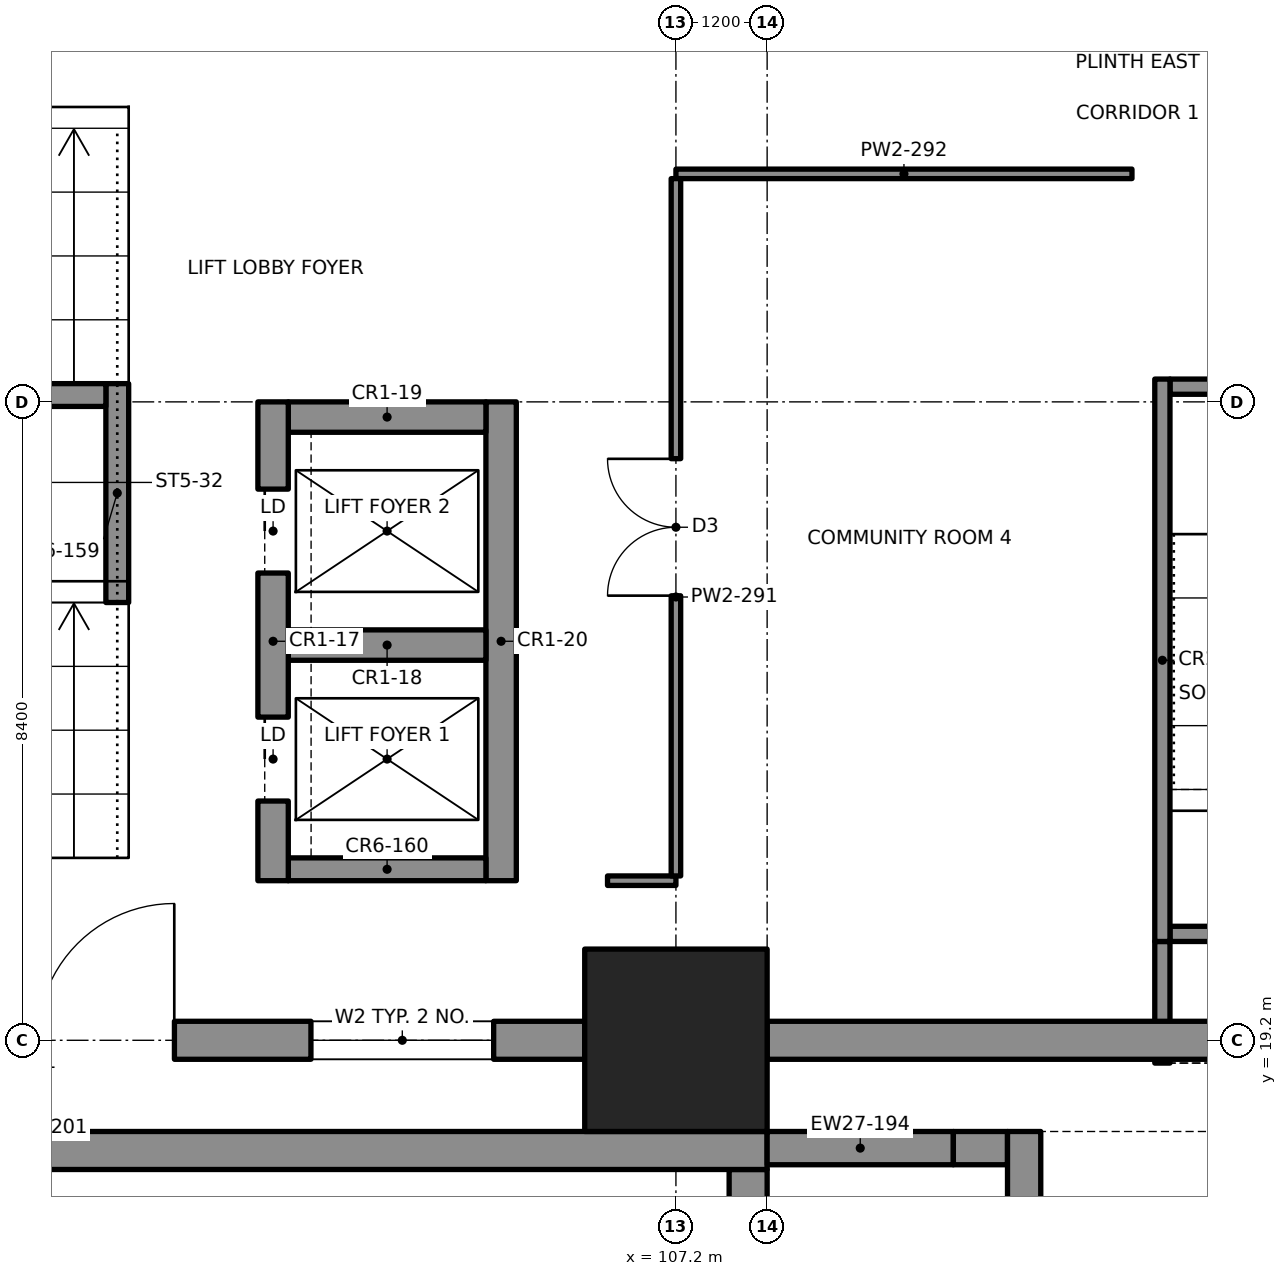
"""IFC4 building model, lengths in metres.
Left out: names, types, materials, properties, quantities, classifications, styles, units other than length and angle.
Written with IfcOpenShell. Run it as: python <this file> out.ifc"""

import sys

from ifc_helpers import new_model, si_unit, direction, frame, frame_2d, origin, origin_2d, place, context, subcontext, project, spatial, rectangle, extrude, element, fill, save


model = new_model("IFC4")
c1 = context("Model", 3, precision=1e-05, world=origin(), true_north=direction((0.0, 1.0)))
c2 = subcontext(c1, "Body", "Model", "MODEL_VIEW")
j1 = project(units=[si_unit("LENGTHUNIT", "METRE"), si_unit("PLANEANGLEUNIT", "RADIAN")], contexts=[c1])
p1 = place(None, origin())
s1 = spatial("IfcSite", under=j1, at=p1, CompositionType="ELEMENT")
p2 = place(p1, origin())
s2 = spatial("IfcBuilding", under=s1, at=p2, CompositionType="ELEMENT")
p3 = place(p2, origin())
s3 = spatial("IfcBuildingStorey", under=s2, at=p3, CompositionType="ELEMENT", Elevation=0.0)
p4 = place(p3, frame((107.2, 19.2, -0.9), z_axis=(0.0, 0.0, 1.0), x_axis=(1.0, 0.0, 0.0)))
e1 = element("IfcColumn", 1, at=p4, inside=s3, PredefinedType="COLUMN", context=c2, shape_type="SweptSolid", body=[
    extrude(rectangle(XDim=2.4, YDim=2.4, at=origin_2d()), origin(), (0.0, 0.0, 1.0), 5.3),
])
p5 = place(p3, frame((91.6, 19.2, 0.0), z_axis=(0.0, 0.0, 1.0), x_axis=(1.0, 0.0, 0.0)))
e2 = element("IfcWall", 2, at=p5, inside=s3, PredefinedType="SOLIDWALL", context=c2, shape_type="SweptSolid", body=[
    extrude(rectangle(XDim=14.4, YDim=0.5, at=frame_2d((7.2, 0.0))), origin(), (0.0, 0.0, 1.0), 3.65),
])
p6 = place(p5, frame((1.2, 0.0, 0.45)))
e3 = element("IfcOpeningElement", 3, at=p6, cuts=e2, PredefinedType="OPENING", context=c2, shape_type="SweptSolid", body=[
    extrude(rectangle(XDim=2.4, YDim=2.7, at=frame_2d((1.2, 1.35))), frame((0.0, 0.26, 0.0), z_axis=(0.0, -1.0, 0.0), x_axis=(1.0, 0.0, 0.0)), (0.0, 0.0, 1.0), 0.52),
])
p7 = place(p5, frame((10.8, 0.0, 0.45)))
e4 = element("IfcOpeningElement", 4, at=p7, cuts=e2, PredefinedType="OPENING", context=c2, shape_type="SweptSolid", body=[
    extrude(rectangle(XDim=2.4, YDim=2.7, at=frame_2d((1.2, 1.35))), frame((0.0, 0.26, 0.0), z_axis=(0.0, -1.0, 0.0), x_axis=(1.0, 0.0, 0.0)), (0.0, 0.0, 1.0), 0.52),
])
p8 = place(p5, frame((5.4, 0.0, 0.0)))
e5 = element("IfcOpeningElement", 5, at=p8, cuts=e2, PredefinedType="OPENING", context=c2, shape_type="SweptSolid", body=[
    extrude(rectangle(XDim=3.6, YDim=2.7, at=frame_2d((1.8, 1.35))), frame((0.0, 0.26, 0.0), z_axis=(0.0, -1.0, 0.0), x_axis=(1.0, 0.0, 0.0)), (0.0, 0.0, 1.0), 0.52),
])
p9 = place(p3, frame((108.4, 19.2, 0.0), z_axis=(0.0, 0.0, 1.0), x_axis=(1.0, 0.0, 0.0)))
e6 = element("IfcWall", 6, at=p9, inside=s3, PredefinedType="SOLIDWALL", context=c2, shape_type="SweptSolid", body=[
    extrude(rectangle(XDim=14.4, YDim=0.5, at=frame_2d((7.2, 0.0))), origin(), (0.0, 0.0, 1.0), 3.65),
])
p10 = place(p9, frame((11.04, 0.0, 0.45)))
e7 = element("IfcOpeningElement", 7, at=p10, cuts=e6, PredefinedType="OPENING", context=c2, shape_type="SweptSolid", body=[
    extrude(rectangle(XDim=2.4, YDim=2.7, at=frame_2d((1.2, 1.35))), frame((0.0, 0.26, 0.0), z_axis=(0.0, -1.0, 0.0), x_axis=(1.0, 0.0, 0.0)), (0.0, 0.0, 1.0), 0.52),
])
p11 = place(p9, frame((6.3, 0.0, 0.0)))
e8 = element("IfcOpeningElement", 8, at=p11, cuts=e6, PredefinedType="OPENING", context=c2, shape_type="SweptSolid", body=[
    extrude(rectangle(XDim=1.8, YDim=2.4, at=frame_2d((0.9, 1.2))), frame((0.0, 0.26, 0.0), z_axis=(0.0, -1.0, 0.0), x_axis=(1.0, 0.0, 0.0)), (0.0, 0.0, 1.0), 0.52),
])
p12 = place(p3, frame((108.15, 6.5, 0.0), z_axis=(0.0, 0.0, 1.0), x_axis=(0.0, 1.0, 0.0)))
e9 = element("IfcWall", 9, at=p12, inside=s3, PredefinedType="SOLIDWALL", context=c2, shape_type="SweptSolid", body=[
    extrude(rectangle(XDim=11.0, YDim=0.5, at=frame_2d((5.5, 0.0))), origin(), (0.0, 0.0, 1.0), 4.4),
])
p13 = place(p3, frame((89.2, 17.75, 0.0), z_axis=(0.0, 0.0, 1.0), x_axis=(1.0, 0.0, 0.0)))
e10 = element("IfcWall", 10, at=p13, inside=s3, PredefinedType="SOLIDWALL", context=c2, shape_type="SweptSolid", body=[
    extrude(rectangle(XDim=19.2, YDim=0.5, at=frame_2d((9.6, 0.0))), origin(), (0.0, 0.0, 1.0), 4.4),
])
p14 = place(p3, frame((111.781, 6.0, 0.0), z_axis=(0.0, 0.0, 1.0), x_axis=(0.0, 1.0, 0.0)))
e11 = element("IfcWall", 11, at=p14, inside=s3, PredefinedType="SOLIDWALL", context=c2, shape_type="SweptSolid", body=[
    extrude(rectangle(XDim=12.0, YDim=0.438, at=frame_2d((6.0, 0.0))), origin(), (0.0, 0.0, 1.0), 4.4),
])
p15 = place(p14, frame((1.8, 0.0, 0.9)))
e12 = element("IfcOpeningElement", 12, at=p15, cuts=e11, PredefinedType="OPENING", context=c2, shape_type="SweptSolid", body=[
    extrude(rectangle(XDim=2.4, YDim=2.4, at=frame_2d((1.2, 1.2))), frame((0.0, 0.229, 0.0), z_axis=(0.0, -1.0, 0.0), x_axis=(1.0, 0.0, 0.0)), (0.0, 0.0, 1.0), 0.458),
])
p16 = place(p14, frame((7.5, 0.0, 0.9)))
e13 = element("IfcOpeningElement", 13, at=p16, cuts=e11, PredefinedType="OPENING", context=c2, shape_type="SweptSolid", body=[
    extrude(rectangle(XDim=2.4, YDim=2.4, at=frame_2d((1.2, 1.2))), frame((0.0, 0.229, 0.0), z_axis=(0.0, -1.0, 0.0), x_axis=(1.0, 0.0, 0.0)), (0.0, 0.0, 1.0), 0.458),
])
p17 = place(p3, frame((108.4, 17.781, -0.9), z_axis=(0.0, 0.0, 1.0), x_axis=(1.0, 0.0, 0.0)))
e14 = element("IfcWall", 14, at=p17, inside=s3, PredefinedType="SOLIDWALL", context=c2, shape_type="SweptSolid", body=[
    extrude(rectangle(XDim=2.45, YDim=0.438, at=frame_2d((1.225, 0.0))), origin(), (0.0, 0.0, 1.0), 5.3),
])
p18 = place(p3, frame((110.85, 17.781, 0.0), z_axis=(0.0, 0.0, 1.0), x_axis=(1.0, 0.0, 0.0)))
e15 = element("IfcWall", 15, at=p18, inside=s3, PredefinedType="SOLIDWALL", context=c2, shape_type="SweptSolid", body=[
    extrude(rectangle(XDim=0.712, YDim=0.438, at=frame_2d((0.356, 0.0))), origin(), (0.0, 0.0, 1.0), 4.4),
])
p19 = place(p3, frame((113.6, 20.5, 0.0), z_axis=(0.0, 0.0, 1.0), x_axis=(0.0, 1.0, 0.0)))
e16 = element("IfcWall", 16, at=p19, inside=s3, PredefinedType="SOLIDWALL", context=c2, shape_type="SweptSolid", body=[
    extrude(rectangle(XDim=7.4, YDim=0.2, at=frame_2d((3.7, 0.0))), origin(), (0.0, 0.0, 1.0), 4.4),
])
p20 = place(p3, frame((113.7, 20.6, 0.0), z_axis=(0.0, 0.0, 1.0), x_axis=(1.0, 0.0, 0.0)))
e17 = element("IfcWall", 17, at=p20, inside=s3, PredefinedType="SOLIDWALL", context=c2, shape_type="SweptSolid", body=[
    extrude(rectangle(XDim=3.8, YDim=0.2, at=frame_2d((1.9, 0.0))), origin(), (0.0, 0.0, 1.0), 4.4),
])
p21 = place(p20, frame((1.05, 0.0, 0.0)))
e18 = element("IfcOpeningElement", 18, at=p21, cuts=e17, PredefinedType="OPENING", context=c2, shape_type="SweptSolid", body=[
    extrude(rectangle(XDim=1.7, YDim=2.1, at=frame_2d((0.85, 1.05))), frame((0.0, 0.11, 0.0), z_axis=(0.0, -1.0, 0.0), x_axis=(1.0, 0.0, 0.0)), (0.0, 0.0, 1.0), 0.22),
])
p22 = place(p3, frame((113.7, 27.8, 0.0), z_axis=(0.0, 0.0, 1.0), x_axis=(1.0, 0.0, 0.0)))
e19 = element("IfcWall", 19, at=p22, inside=s3, PredefinedType="SOLIDWALL", context=c2, shape_type="SweptSolid", body=[
    extrude(rectangle(XDim=3.8, YDim=0.2, at=frame_2d((1.9, 0.0))), origin(), (0.0, 0.0, 1.0), 4.4),
])
p23 = place(p3, frame((113.6, 18.9, 0.0), z_axis=(0.0, 0.0, 1.0), x_axis=(0.0, 1.0, 0.0)))
e20 = element("IfcWall", 20, at=p23, inside=s3, PredefinedType="SOLIDWALL", context=c2, shape_type="SweptSolid", body=[
    extrude(rectangle(XDim=1.6, YDim=0.2, at=frame_2d((0.8, 0.0))), origin(), (0.0, 0.0, 1.0), 4.4),
])
p24 = place(p3, frame((101.9, 21.3, -1.5), z_axis=(0.0, 0.0, 1.0), x_axis=(0.0, 1.0, 0.0)))
e21 = element("IfcWall", 21, at=p24, inside=s3, PredefinedType="SHEAR", context=c2, shape_type="SweptSolid", body=[
    extrude(rectangle(XDim=6.3, YDim=0.4, at=frame_2d((3.15, 0.0))), origin(), (0.0, 0.0, 1.0), 5.9),
])
p25 = place(p24, frame((1.05, 0.0, 1.5)))
e22 = element("IfcOpeningElement", 22, at=p25, cuts=e21, PredefinedType="OPENING", context=c2, shape_type="SweptSolid", body=[
    extrude(rectangle(XDim=1.1, YDim=2.1, at=frame_2d((0.55, 1.05))), frame((0.0, 0.21, 0.0), z_axis=(0.0, -1.0, 0.0), x_axis=(1.0, 0.0, 0.0)), (0.0, 0.0, 1.0), 0.42),
])
p26 = place(p24, frame((4.05, 0.0, 1.5)))
e23 = element("IfcOpeningElement", 23, at=p26, cuts=e21, PredefinedType="OPENING", context=c2, shape_type="SweptSolid", body=[
    extrude(rectangle(XDim=1.1, YDim=2.1, at=frame_2d((0.55, 1.05))), frame((0.0, 0.21, 0.0), z_axis=(0.0, -1.0, 0.0), x_axis=(1.0, 0.0, 0.0)), (0.0, 0.0, 1.0), 0.42),
])
p27 = place(p3, frame((104.9, 21.3, -1.5), z_axis=(0.0, 0.0, 1.0), x_axis=(0.0, 1.0, 0.0)))
e24 = element("IfcWall", 24, at=p27, inside=s3, PredefinedType="SHEAR", context=c2, shape_type="SweptSolid", body=[
    extrude(rectangle(XDim=6.3, YDim=0.4, at=frame_2d((3.15, 0.0))), origin(), (0.0, 0.0, 1.0), 5.9),
])
p28 = place(p3, frame((102.1, 21.45, -1.5), z_axis=(0.0, 0.0, 1.0), x_axis=(1.0, 0.0, 0.0)))
e25 = element("IfcWall", 25, at=p28, inside=s3, PredefinedType="SOLIDWALL", context=c2, shape_type="SweptSolid", body=[
    extrude(rectangle(XDim=2.6, YDim=0.3, at=frame_2d((1.3, 0.0))), origin(), (0.0, 0.0, 1.0), 5.9),
])
for number, where, z_axis, x_axis in (
    (26, (102.1, 24.4, -1.5), (0.0, 0.0, 1.0), (1.0, 0.0, 0.0)),
    (27, (102.1, 27.4, -1.5), (0.0, 0.0, 1.0), (1.0, 0.0, 0.0)),
):
    element("IfcWall", number, at=place(p3, frame(where, z_axis=z_axis, x_axis=x_axis)), inside=s3, PredefinedType="SHEAR", context=c2, shape_type="SweptSolid", body=[
        extrude(rectangle(XDim=2.6, YDim=0.4, at=frame_2d((1.3, 0.0))), origin(), (0.0, 0.0, 1.0), 5.9),
    ])
p29 = place(p3, frame((99.85, 24.96, 0.0), z_axis=(0.0, 0.0, 1.0), x_axis=(0.0, 1.0, 0.0)))
e28 = element("IfcWall", 28, at=p29, inside=s3, PredefinedType="SOLIDWALL", context=c2, shape_type="SweptSolid", body=[
    extrude(rectangle(XDim=2.88, YDim=0.3, at=frame_2d((1.44, 0.0))), origin(), (0.0, 0.0, 1.0), 2.0),
])
p30 = place(p3, frame((93.1, 27.69, 0.0), z_axis=(0.0, 0.0, 1.0), x_axis=(1.0, 0.0, 0.0)))
e29 = element("IfcWall", 29, at=p30, inside=s3, PredefinedType="SOLIDWALL", context=c2, shape_type="SweptSolid", body=[
    extrude(rectangle(XDim=6.6, YDim=0.3, at=frame_2d((3.3, 0.0))), origin(), (0.0, 0.0, 1.0), 2.0),
])
p31 = place(p3, frame((106.3, 21.3, 0.0), z_axis=(0.0, 0.0, 1.0), x_axis=(1.0, 0.0, 0.0)))
e30 = element("IfcWall", 30, at=p31, inside=s3, PredefinedType="PARTITIONING", context=c2, shape_type="SweptSolid", body=[
    extrude(rectangle(XDim=0.9, YDim=0.125, at=frame_2d((0.45, 0.0))), origin(), (0.0, 0.0, 1.0), 3.65),
])
p32 = place(p3, frame((107.2, 30.6, 0.0), z_axis=(0.0, 0.0, 1.0), x_axis=(1.0, 0.0, 0.0)))
e31 = element("IfcWall", 31, at=p32, inside=s3, PredefinedType="PARTITIONING", context=c2, shape_type="SweptSolid", body=[
    extrude(rectangle(XDim=6.0, YDim=0.125, at=frame_2d((3.0, 0.0))), origin(), (0.0, 0.0, 1.0), 3.65),
])
p33 = place(p3, frame((107.2, 21.363, 0.0), z_axis=(0.0, 0.0, 1.0), x_axis=(0.0, 1.0, 0.0)))
e32 = element("IfcWall", 32, at=p33, inside=s3, PredefinedType="PARTITIONING", context=c2, shape_type="SweptSolid", body=[
    extrude(rectangle(XDim=9.175, YDim=0.125, at=frame_2d((4.587, 0.0))), origin(), (0.0, 0.0, 1.0), 3.65),
])
p34 = place(p33, frame((3.688, 0.0, 0.0)))
e33 = element("IfcOpeningElement", 33, at=p34, cuts=e32, PredefinedType="OPENING", context=c2, shape_type="SweptSolid", body=[
    extrude(rectangle(XDim=1.8, YDim=2.1, at=frame_2d((0.9, 1.05))), frame((0.0, 0.073, 0.0), z_axis=(0.0, -1.0, 0.0), x_axis=(1.0, 0.0, 0.0)), (0.0, 0.0, 1.0), 0.145),
])
p35 = place(p7, origin())
e34 = element("IfcWindow", 34, at=p35, inside=s3, PartitioningType="SINGLE_PANEL", PredefinedType="WINDOW", context=c2, shape_type="SweptSolid", body=[
    extrude(rectangle(XDim=2.4, YDim=2.7, at=frame_2d((1.2, 1.35))), frame((0.0, 0.03, 0.0), z_axis=(0.0, -1.0, 0.0), x_axis=(1.0, 0.0, 0.0)), (0.0, 0.0, 1.0), 0.06),
])
fill(e4, e34)
p36 = place(p8, origin())
e35 = element("IfcDoor", 35, at=p36, inside=s3, OperationType="DOUBLE_DOOR_SINGLE_SWING", PredefinedType="DOOR", context=c2, shape_type="SweptSolid", body=[
    extrude(rectangle(XDim=3.6, YDim=2.7, at=frame_2d((1.8, 1.35))), frame((0.0, 0.025, 0.0), z_axis=(0.0, -1.0, 0.0), x_axis=(1.0, 0.0, 0.0)), (0.0, 0.0, 1.0), 0.05),
])
fill(e5, e35)
p37 = place(p25, origin())
e36 = element("IfcDoor", 36, at=p37, inside=s3, OperationType="SLIDING_TO_LEFT", PredefinedType="DOOR", context=c2, shape_type="SweptSolid", body=[
    extrude(rectangle(XDim=1.1, YDim=2.1, at=frame_2d((0.55, 1.05))), frame((0.0, 0.025, 0.0), z_axis=(0.0, -1.0, 0.0), x_axis=(1.0, 0.0, 0.0)), (0.0, 0.0, 1.0), 0.05),
])
fill(e22, e36)
p38 = place(p26, origin())
e37 = element("IfcDoor", 37, at=p38, inside=s3, OperationType="SLIDING_TO_LEFT", PredefinedType="DOOR", context=c2, shape_type="SweptSolid", body=[
    extrude(rectangle(XDim=1.1, YDim=2.1, at=frame_2d((0.55, 1.05))), frame((0.0, 0.025, 0.0), z_axis=(0.0, -1.0, 0.0), x_axis=(1.0, 0.0, 0.0)), (0.0, 0.0, 1.0), 0.05),
])
fill(e23, e37)
p39 = place(p34, origin())
e38 = element("IfcDoor", 38, at=p39, inside=s3, OperationType="DOUBLE_DOOR_SINGLE_SWING", PredefinedType="DOOR", context=c2, shape_type="SweptSolid", body=[
    extrude(rectangle(XDim=1.8, YDim=2.1, at=frame_2d((0.9, 1.05))), frame((0.0, 0.025, 0.0), z_axis=(0.0, -1.0, 0.0), x_axis=(1.0, 0.0, 0.0)), (0.0, 0.0, 1.0), 0.05),
])
fill(e33, e38)
save(model, sys.argv[1])
